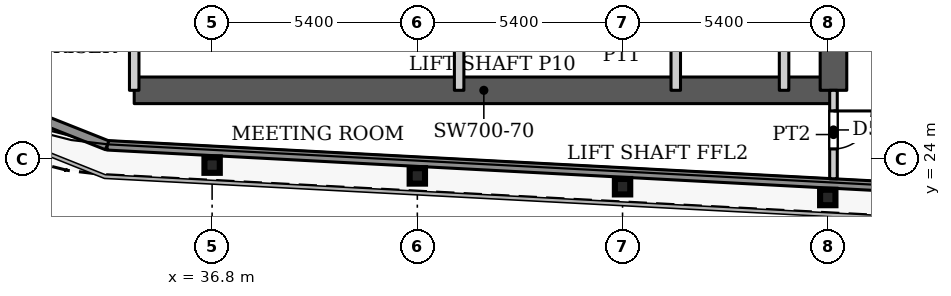
"""IFC4 building model, lengths in metres.
Left out: names, types, materials, properties, quantities, classifications, styles, units other than length and angle.
Written with IfcOpenShell. Run it as: python <this file> out.ifc"""

import sys

from ifc_helpers import new_model, si_unit, direction, frame, frame_2d, origin, origin_2d, place, context, subcontext, project, spatial, rectangle, i_section, extrude, source, transform, mapped, element, fill, save


model = new_model("IFC4")
c1 = context("Model", 3, precision=1e-05, world=origin(), true_north=direction((0.0, 1.0)))
c2 = subcontext(c1, "Body", "Model", "MODEL_VIEW")
j1 = project(units=[si_unit("LENGTHUNIT", "METRE"), si_unit("PLANEANGLEUNIT", "RADIAN")], contexts=[c1])
p1 = place(None, origin())
s1 = spatial("IfcSite", under=j1, at=p1, CompositionType="ELEMENT")
p2 = place(p1, origin())
s2 = spatial("IfcBuilding", under=s1, at=p2, CompositionType="ELEMENT")
p3 = place(p2, frame((0.0, 0.0, 227.9)))
s3 = spatial("IfcBuildingStorey", under=s2, at=p3, CompositionType="ELEMENT", Elevation=227.9)
for number, where, z_axis, x_axis in (
    (1, (53.0, 22.98, 0.0), (0.0, 0.0, 1.0), (1.0, 0.0, 0.0)),
    (2, (47.6, 23.264, 0.0), (0.0, 0.0, 1.0), (1.0, 0.0, 0.0)),
    (3, (42.2, 23.548, 0.0), (0.0, 0.0, 1.0), (1.0, 0.0, 0.0)),
    (4, (36.8, 23.832, 0.0), (0.0, 0.0, 1.0), (1.0, 0.0, 0.0)),
):
    element("IfcColumn", number, at=place(p3, frame(where, z_axis=z_axis, x_axis=x_axis)), inside=s3, PredefinedType="COLUMN", context=c2, shape_type="SweptSolid", body=[
        extrude(i_section(OverallWidth=0.404, OverallDepth=0.407, WebThickness=0.027, FlangeThickness=0.044, FilletRadius=0.012, at=origin_2d()), origin(), (0.0, 0.0, 1.0), 3.9),
    ])
p4 = place(p3, frame((34.75, 25.8, 0.0), z_axis=(0.0, 0.0, 1.0), x_axis=(1.0, 0.0, 0.0)))
e5 = element("IfcWall", 5, at=p4, inside=s3, PredefinedType="SHEAR", context=c2, shape_type="SweptSolid", body=[
    extrude(rectangle(XDim=18.4, YDim=0.7, at=frame_2d((9.2, 0.0))), origin(), (0.0, 0.0, 1.0), 3.9),
])
p5 = place(p3, frame((53.15, 25.8, 0.0), z_axis=(0.0, 0.0, 1.0), x_axis=(0.0, 1.0, 0.0)))
e6 = element("IfcWall", 6, at=p5, inside=s3, PredefinedType="SHEAR", context=c2, shape_type="SweptSolid", body=[
    extrude(rectangle(XDim=10.4, YDim=0.7, at=frame_2d((5.2, 0.0))), origin(), (0.0, 0.0, 1.0), 3.9),
])
p6 = place(p3, frame((84.386, 21.703, 0.0), z_axis=(0.0, 0.0, 1.0), x_axis=(-0.998617508267, 0.05256493302, 0.0)))
e7 = element("IfcWall", 7, at=p6, inside=s3, PredefinedType="SOLIDWALL", context=c2, shape_type="SweptSolid", body=[
    extrude(rectangle(XDim=50.417, YDim=0.25, at=frame_2d((25.208, 0.0))), origin(), (0.0, 0.0, 1.0), 3.75),
])
p7 = place(p3, frame((34.039, 24.353, 0.0), z_axis=(0.0, 0.0, 1.0), x_axis=(-0.929352825399, 0.369192803184, 0.0)))
e8 = element("IfcWall", 8, at=p7, inside=s3, PredefinedType="SOLIDWALL", context=c2, shape_type="SweptSolid", body=[
    extrude(rectangle(XDim=4.656, YDim=0.25, at=frame_2d((2.328, 0.0))), origin(), (0.0, 0.0, 1.0), 3.75),
])
for number, where, z_axis, x_axis in (
    (9, (34.75, 25.8, 0.0), (0.0, 0.0, 1.0), (0.0, 1.0, 0.0)),
    (10, (43.3, 25.8, 0.0), (0.0, 0.0, 1.0), (0.0, 1.0, 0.0)),
    (11, (49.0, 25.8, 0.0), (0.0, 0.0, 1.0), (0.0, 1.0, 0.0)),
    (12, (51.85, 25.8, 0.0), (0.0, 0.0, 1.0), (0.0, 1.0, 0.0)),
):
    element("IfcWall", number, at=place(p3, frame(where, z_axis=z_axis, x_axis=x_axis)), inside=s3, PredefinedType="PARTITIONING", context=c2, shape_type="SweptSolid", body=[
        extrude(rectangle(XDim=3.25, YDim=0.25, at=frame_2d((1.625, 0.0))), origin(), (0.0, 0.0, 1.0), 3.9),
    ])
p8 = place(p3, frame((53.15, 23.472, 0.0), z_axis=(0.0, 0.0, 1.0), x_axis=(0.0, 1.0, 0.0)))
e13 = element("IfcWall", 13, at=p8, inside=s3, PredefinedType="PARTITIONING", context=c2, shape_type="SweptSolid", body=[
    extrude(rectangle(XDim=2.328, YDim=0.2, at=frame_2d((1.164, 0.0))), origin(), (0.0, 0.0, 1.0), 3.6),
])
p9 = place(p8, frame((0.785, 0.0, 0.0)))
e14 = element("IfcOpeningElement", 14, at=p9, cuts=e13, PredefinedType="OPENING", context=c2, shape_type="SweptSolid", body=[
    extrude(rectangle(XDim=1.0, YDim=2.1, at=frame_2d((0.5, 1.05))), frame((0.0, 0.11, 0.0), z_axis=(0.0, -1.0, 0.0), x_axis=(1.0, 0.0, 0.0)), (0.0, 0.0, 1.0), 0.22),
])
m1 = source(origin(), c2, "Body", "SweptSolid", [
    extrude(rectangle(XDim=1.0, YDim=2.1, at=frame_2d((0.5, 1.05))), frame((0.0, 0.025, 0.0), z_axis=(0.0, -1.0, 0.0), x_axis=(1.0, 0.0, 0.0)), (0.0, 0.0, 1.0), 0.05),
])
p10 = place(p9, origin())
e15 = element("IfcDoor", 15, at=p10, inside=s3, OperationType="SINGLE_SWING_RIGHT", PredefinedType="DOOR", context=c2, shape_type="MappedRepresentation", body=[
    mapped(m1, transform((0.0, 0.0, 0.0), x_axis=(1.0, 0.0, 0.0), y_axis=(0.0, 1.0, 0.0), z_axis=(0.0, 0.0, 1.0), scale=1.0)),
])
fill(e14, e15)
save(model, sys.argv[1])
